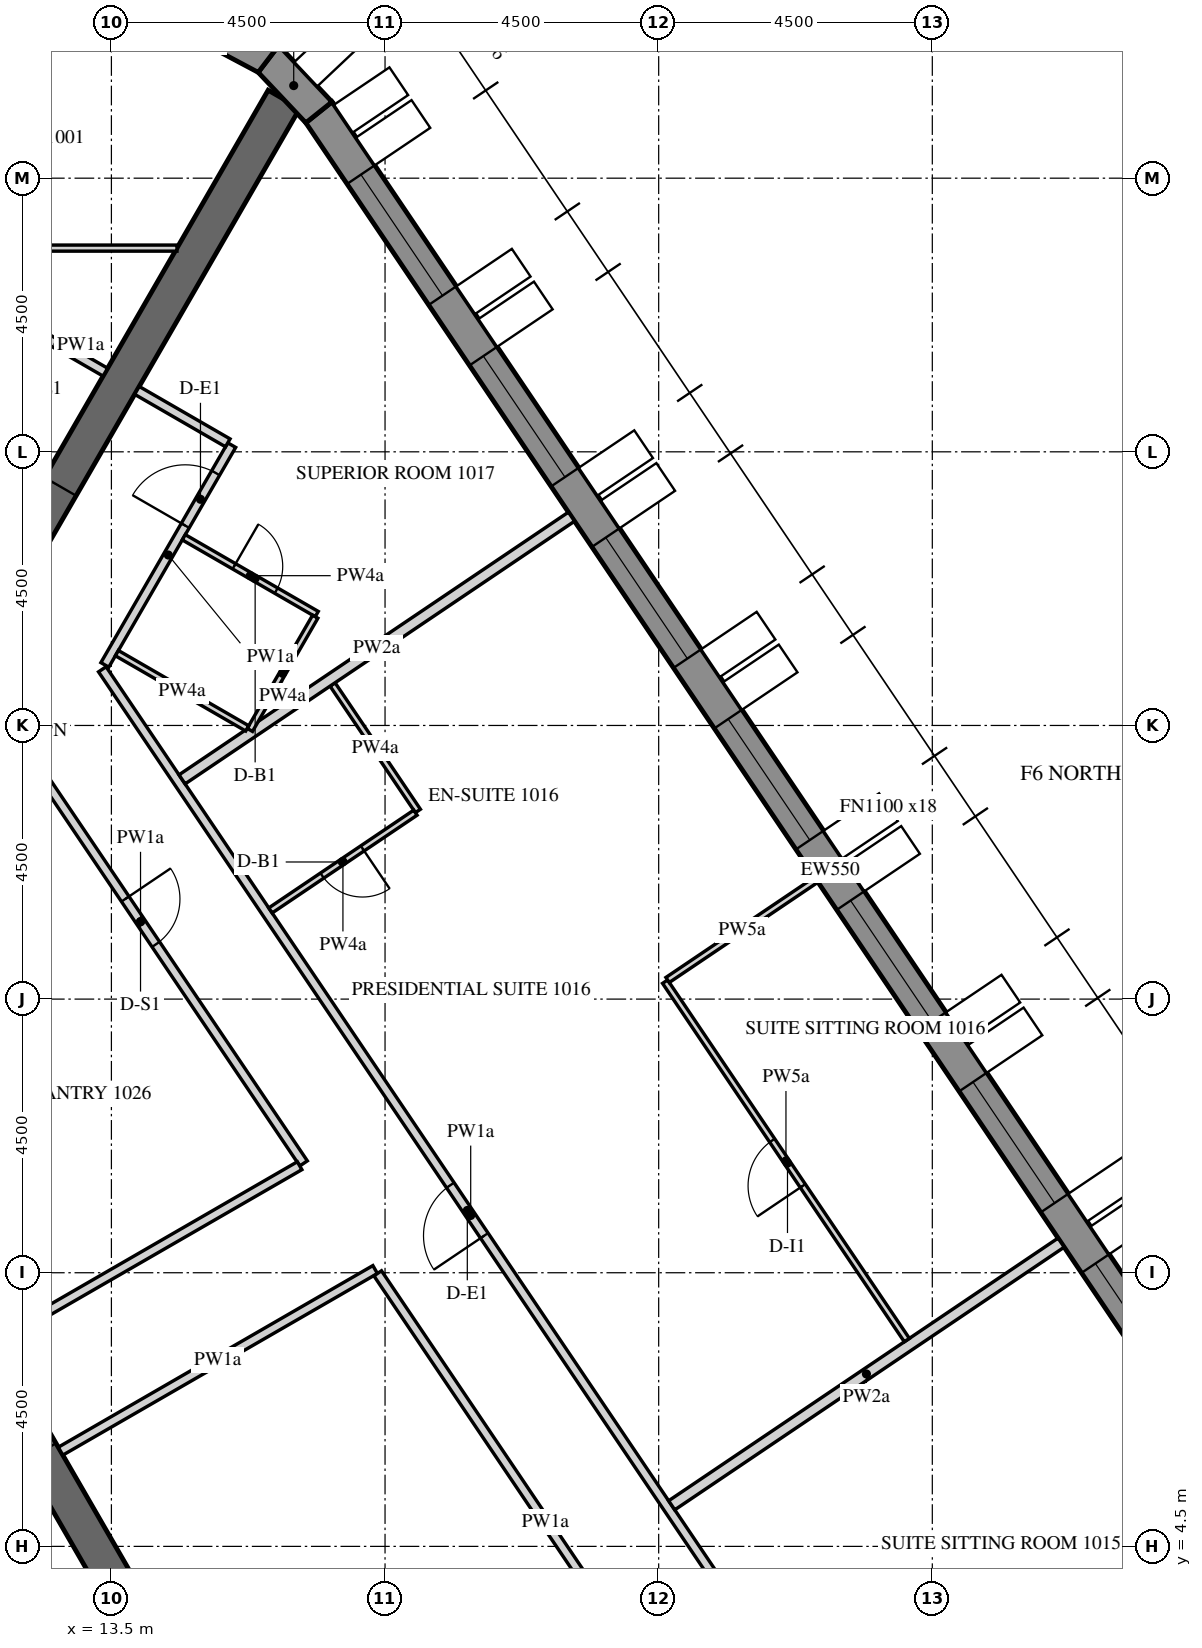
"""IFC4 building model, lengths in metres.
Left out: names, types, materials, properties, quantities, classifications, styles, units other than length and angle.
Written with IfcOpenShell. Run it as: python <this file> out.ifc"""

import sys

from ifc_helpers import new_model, si_unit, direction, frame, frame_2d, origin, place, context, subcontext, project, spatial, polyline, rectangle, outline, extrude, element, fill, save


model = new_model("IFC4")
c1 = context("Model", 3, precision=1e-05, world=origin(), true_north=direction((0.0, 1.0)))
c2 = subcontext(c1, "Body", "Model", "MODEL_VIEW")
j1 = project(units=[si_unit("LENGTHUNIT", "METRE"), si_unit("PLANEANGLEUNIT", "RADIAN")], contexts=[c1])
p1 = place(None, origin())
s1 = spatial("IfcSite", under=j1, at=p1, CompositionType="ELEMENT")
p2 = place(p1, origin())
s2 = spatial("IfcBuilding", under=s1, at=p2, CompositionType="ELEMENT")
p3 = place(p2, frame((0.0, 0.0, 135.0)))
s3 = spatial("IfcBuildingStorey", under=s2, at=p3, CompositionType="ELEMENT", Elevation=135.0)
p4 = place(p3, frame((33.728, 3.153, -0.15), z_axis=(0.0, 0.0, 1.0), x_axis=(-0.559192411416, 0.82903790445, 0.0)))
e1 = element("IfcWall", 1, at=p4, inside=s3, PredefinedType="SOLIDWALL", context=c2, shape_type="SweptSolid", body=[
    extrude(outline(polyline([(-0.026, -0.275), (30.093, -0.275), (30.048, 0.275), (0.026, 0.275), (-0.026, -0.275)])), origin(), (0.0, 0.0, 1.0), 3.9),
])
p5 = place(p4, frame((1.236, 0.0, 1.05)))
e2 = element("IfcOpeningElement", 2, at=p5, cuts=e1, PredefinedType="OPENING", context=c2, shape_type="SweptSolid", body=[
    extrude(rectangle(XDim=2.4, YDim=2.4, at=frame_2d((1.2, 1.2))), frame((0.0, 0.285, 0.0), z_axis=(0.0, -1.0, 0.0), x_axis=(1.0, 0.0, 0.0)), (0.0, 0.0, 1.0), 0.57),
])
p6 = place(p4, frame((4.835, 0.0, 1.05)))
e3 = element("IfcOpeningElement", 3, at=p6, cuts=e1, PredefinedType="OPENING", context=c2, shape_type="SweptSolid", body=[
    extrude(rectangle(XDim=2.4, YDim=2.4, at=frame_2d((1.2, 1.2))), frame((0.0, 0.285, 0.0), z_axis=(0.0, -1.0, 0.0), x_axis=(1.0, 0.0, 0.0)), (0.0, 0.0, 1.0), 0.57),
])
p7 = place(p4, frame((8.436, 0.0, 1.05)))
e4 = element("IfcOpeningElement", 4, at=p7, cuts=e1, PredefinedType="OPENING", context=c2, shape_type="SweptSolid", body=[
    extrude(rectangle(XDim=2.4, YDim=2.4, at=frame_2d((1.2, 1.2))), frame((0.0, 0.285, 0.0), z_axis=(0.0, -1.0, 0.0), x_axis=(1.0, 0.0, 0.0)), (0.0, 0.0, 1.0), 0.57),
])
p8 = place(p4, frame((12.035, 0.0, 1.05)))
e5 = element("IfcOpeningElement", 5, at=p8, cuts=e1, PredefinedType="OPENING", context=c2, shape_type="SweptSolid", body=[
    extrude(rectangle(XDim=2.4, YDim=2.4, at=frame_2d((1.2, 1.2))), frame((0.0, 0.285, 0.0), z_axis=(0.0, -1.0, 0.0), x_axis=(1.0, 0.0, 0.0)), (0.0, 0.0, 1.0), 0.57),
])
p9 = place(p4, frame((15.635, 0.0, 1.05)))
e6 = element("IfcOpeningElement", 6, at=p9, cuts=e1, PredefinedType="OPENING", context=c2, shape_type="SweptSolid", body=[
    extrude(rectangle(XDim=2.4, YDim=2.4, at=frame_2d((1.2, 1.2))), frame((0.0, 0.285, 0.0), z_axis=(0.0, -1.0, 0.0), x_axis=(1.0, 0.0, 0.0)), (0.0, 0.0, 1.0), 0.57),
])
p10 = place(p4, frame((19.236, 0.0, 1.05)))
e7 = element("IfcOpeningElement", 7, at=p10, cuts=e1, PredefinedType="OPENING", context=c2, shape_type="SweptSolid", body=[
    extrude(rectangle(XDim=2.4, YDim=2.4, at=frame_2d((1.2, 1.2))), frame((0.0, 0.285, 0.0), z_axis=(0.0, -1.0, 0.0), x_axis=(1.0, 0.0, 0.0)), (0.0, 0.0, 1.0), 0.57),
])
p11 = place(p4, frame((22.835, 0.0, 1.05)))
e8 = element("IfcOpeningElement", 8, at=p11, cuts=e1, PredefinedType="OPENING", context=c2, shape_type="SweptSolid", body=[
    extrude(rectangle(XDim=2.4, YDim=2.4, at=frame_2d((1.2, 1.2))), frame((0.0, 0.285, 0.0), z_axis=(0.0, -1.0, 0.0), x_axis=(1.0, 0.0, 0.0)), (0.0, 0.0, 1.0), 0.57),
])
p12 = place(p4, frame((26.436, 0.0, 1.05)))
e9 = element("IfcOpeningElement", 9, at=p12, cuts=e1, PredefinedType="OPENING", context=c2, shape_type="SweptSolid", body=[
    extrude(rectangle(XDim=2.4, YDim=2.4, at=frame_2d((1.2, 1.2))), frame((0.0, 0.285, 0.0), z_axis=(0.0, -1.0, 0.0), x_axis=(1.0, 0.0, 0.0)), (0.0, 0.0, 1.0), 0.57),
])
p13 = place(p3, frame((16.913, 28.083, -0.15), z_axis=(0.0, 0.0, 1.0), x_axis=(-0.686196220404, 0.727416488061, 0.0)))
e10 = element("IfcWall", 10, at=p13, inside=s3, PredefinedType="SOLIDWALL", context=c2, shape_type="SweptSolid", body=[
    extrude(outline(polyline([(-0.022, -0.275), (1.253, -0.275), (1.163, 0.275), (0.022, 0.275), (-0.022, -0.275)])), origin(), (0.0, 0.0, 1.0), 3.9),
])
p14 = place(p3, frame((16.083, 28.962, -0.15), z_axis=(0.0, 0.0, 1.0), x_axis=(-0.882995347911, 0.469381737574, 0.0)))
e11 = element("IfcWall", 11, at=p14, inside=s3, PredefinedType="SOLIDWALL", context=c2, shape_type="SweptSolid", body=[
    extrude(outline(polyline([(-0.045, -0.275), (1.253, -0.275), (1.163, 0.275), (0.045, 0.275), (-0.045, -0.275)])), origin(), (0.0, 0.0, 1.0), 3.9),
])
p15 = place(p3, frame((15.819, 0.0, -0.15), z_axis=(0.0, 0.0, 1.0), x_axis=(-0.499999880136, 0.866025472988, 0.0)))
e12 = element("IfcWall", 12, at=p15, inside=s3, PredefinedType="SHEAR", context=c2, shape_type="SweptSolid", body=[
    extrude(outline(polyline([(-0.173, -0.3), (15.993, -0.3), (15.646, 0.3), (0.173, 0.3), (-0.173, -0.3)])), origin(), (0.0, 0.0, 1.0), 3.9),
])
p16 = place(p15, frame((6.981, 0.0, 0.15)))
e13 = element("IfcOpeningElement", 13, at=p16, cuts=e12, PredefinedType="OPENING", context=c2, shape_type="SweptSolid", body=[
    extrude(rectangle(XDim=1.8, YDim=2.4, at=frame_2d((0.9, 1.2))), frame((0.0, 0.31, 0.0), z_axis=(0.0, -1.0, 0.0), x_axis=(1.0, 0.0, 0.0)), (0.0, 0.0, 1.0), 0.62),
])
p17 = place(p3, frame((8.083, 14.0, -0.15), z_axis=(0.0, 0.0, 1.0), x_axis=(0.499997680643, 0.866026742862, 0.0)))
e14 = element("IfcWall", 14, at=p17, inside=s3, PredefinedType="SHEAR", context=c2, shape_type="SweptSolid", body=[
    extrude(rectangle(XDim=16.509, YDim=0.6, at=frame_2d((8.254, 0.0))), origin(), (0.0, 0.0, 1.0), 3.9),
])
p18 = place(p17, frame((7.354, 0.0, 0.15)))
e15 = element("IfcOpeningElement", 15, at=p18, cuts=e14, PredefinedType="OPENING", context=c2, shape_type="SweptSolid", body=[
    extrude(rectangle(XDim=1.8, YDim=2.4, at=frame_2d((0.9, 1.2))), frame((0.0, 0.31, 0.0), z_axis=(0.0, -1.0, 0.0), x_axis=(1.0, 0.0, 0.0)), (0.0, 0.0, 1.0), 0.62),
])
p19 = place(p3, frame((13.4, 23.81, 0.0), z_axis=(0.0, 0.0, 1.0), x_axis=(-0.865989075817, 0.500062916607, 0.0)))
e16 = element("IfcWall", 16, at=p19, inside=s3, PredefinedType="PARTITIONING", context=c2, shape_type="SweptSolid", body=[
    extrude(rectangle(XDim=1.8, YDim=0.15, at=frame_2d((0.9, 0.0))), origin(), (0.0, 0.0, 1.0), 2.838),
])
p20 = place(p3, frame((25.467, 0.96, 0.0), z_axis=(0.0, 0.0, 1.0), x_axis=(-0.559200743185, 0.829032284547, 0.0)))
e17 = element("IfcWall", 17, at=p20, inside=s3, PredefinedType="PARTITIONING", context=c2, shape_type="SweptSolid", body=[
    extrude(rectangle(XDim=21.668, YDim=0.15, at=frame_2d((10.834, 0.0))), origin(), (0.0, 0.0, 1.0), 2.838),
])
p21 = place(p20, frame((10.434, 0.0, 0.0)))
e18 = element("IfcOpeningElement", 18, at=p21, cuts=e17, PredefinedType="OPENING", context=c2, shape_type="SweptSolid", body=[
    extrude(rectangle(XDim=1.0, YDim=2.1, at=frame_2d((0.5, 1.05))), frame((0.0, 0.085, 0.0), z_axis=(0.0, -1.0, 0.0), x_axis=(1.0, 0.0, 0.0)), (0.0, 0.0, 1.0), 0.17),
])
p22 = place(p3, frame((13.392, 18.996, 0.0), z_axis=(0.0, 0.0, 1.0), x_axis=(0.499995902753, 0.866027769318, 0.0)))
e19 = element("IfcWall", 19, at=p22, inside=s3, PredefinedType="PARTITIONING", context=c2, shape_type="SweptSolid", body=[
    extrude(rectangle(XDim=4.173, YDim=0.15, at=frame_2d((2.087, 0.0))), origin(), (0.0, 0.0, 1.0), 2.838),
])
p23 = place(p22, frame((2.645, 0.0, 0.0)))
e20 = element("IfcOpeningElement", 20, at=p23, cuts=e19, PredefinedType="OPENING", context=c2, shape_type="SweptSolid", body=[
    extrude(rectangle(XDim=1.0, YDim=2.1, at=frame_2d((0.5, 1.05))), frame((0.0, 0.085, 0.0), z_axis=(0.0, -1.0, 0.0), x_axis=(1.0, 0.0, 0.0)), (0.0, 0.0, 1.0), 0.17),
])
p24 = place(p3, frame((15.414, 22.648, 0.0), z_axis=(0.0, 0.0, 1.0), x_axis=(-0.866074815912, 0.499914405916, 0.0)))
e21 = element("IfcWall", 21, at=p24, inside=s3, PredefinedType="PARTITIONING", context=c2, shape_type="SweptSolid", body=[
    extrude(rectangle(XDim=1.725, YDim=0.15, at=frame_2d((0.862, 0.0))), origin(), (0.0, 0.0, 1.0), 2.838),
])
p25 = place(p3, frame((12.664, 6.066, 0.0), z_axis=(0.0, 0.0, 1.0), x_axis=(0.866018848283, 0.500011354289, 0.0)))
e22 = element("IfcWall", 22, at=p25, inside=s3, PredefinedType="PARTITIONING", context=c2, shape_type="SweptSolid", body=[
    extrude(rectangle(XDim=5.974, YDim=0.15, at=frame_2d((2.987, 0.0))), origin(), (0.0, 0.0, 1.0), 2.838),
])
p26 = place(p3, frame((17.879, 8.99, 0.0), z_axis=(0.0, 0.0, 1.0), x_axis=(0.559189565351, -0.829039824136, 0.0)))
e23 = element("IfcWall", 23, at=p26, inside=s3, PredefinedType="PARTITIONING", context=c2, shape_type="SweptSolid", body=[
    extrude(rectangle(XDim=9.859, YDim=0.15, at=frame_2d((4.929, 0.0))), origin(), (0.0, 0.0, 1.0), 2.838),
])
p27 = place(p3, frame((11.298, 18.748, 0.0), z_axis=(0.0, 0.0, 1.0), x_axis=(0.559198234291, -0.829033976847, 0.0)))
e24 = element("IfcWall", 24, at=p27, inside=s3, PredefinedType="PARTITIONING", context=c2, shape_type="SweptSolid", body=[
    extrude(rectangle(XDim=9.59, YDim=0.15, at=frame_2d((4.795, 0.0))), origin(), (0.0, 0.0, 1.0), 2.838),
])
p28 = place(p27, frame((4.345, 0.0, 0.0)))
e25 = element("IfcOpeningElement", 25, at=p28, cuts=e24, PredefinedType="OPENING", context=c2, shape_type="SweptSolid", body=[
    extrude(rectangle(XDim=0.9, YDim=2.1, at=frame_2d((0.45, 1.05))), frame((0.0, 0.085, 0.0), z_axis=(0.0, -1.0, 0.0), x_axis=(1.0, 0.0, 0.0)), (0.0, 0.0, 1.0), 0.17),
])
p29 = place(p3, frame((16.595, 10.76, 0.0), z_axis=(0.0, 0.0, 1.0), x_axis=(-0.866019477104, -0.500010265171, 0.0)))
e26 = element("IfcWall", 26, at=p29, inside=s3, PredefinedType="PARTITIONING", context=c2, shape_type="SweptSolid", body=[
    extrude(rectangle(XDim=5.752, YDim=0.15, at=frame_2d((2.876, 0.0))), origin(), (0.0, 0.0, 1.0), 2.838),
])
p30 = place(p3, frame((14.578, 25.85, 0.0), z_axis=(0.0, 0.0, 1.0), x_axis=(-1.0, 0.0, 0.0)))
e27 = element("IfcWall", 27, at=p30, inside=s3, PredefinedType="PARTITIONING", context=c2, shape_type="SweptSolid", body=[
    extrude(rectangle(XDim=8.589, YDim=0.1, at=frame_2d((4.294, 0.0))), origin(), (0.0, 0.0, 1.0), 2.838),
])
p31 = place(p30, frame((4.539, 0.0, 0.0)))
e28 = element("IfcOpeningElement", 28, at=p31, cuts=e27, PredefinedType="OPENING", context=c2, shape_type="SweptSolid", body=[
    extrude(rectangle(XDim=0.9, YDim=2.1, at=frame_2d((0.45, 1.05))), frame((0.0, 0.06, 0.0), z_axis=(0.0, -1.0, 0.0), x_axis=(1.0, 0.0, 0.0)), (0.0, 0.0, 1.0), 0.12),
])
p32 = place(p3, frame((29.119, 9.495, 0.0), z_axis=(0.0, 0.0, 1.0), x_axis=(-0.82903328576, -0.559199258853, 0.0)))
e29 = element("IfcWall", 29, at=p32, inside=s3, PredefinedType="PARTITIONING", context=c2, shape_type="SweptSolid", body=[
    extrude(rectangle(XDim=7.725, YDim=0.18, at=frame_2d((3.863, 0.0))), origin(), (0.0, 0.0, 1.0), 2.838),
])
p33 = place(p3, frame((17.137, 18.675, 0.0), z_axis=(0.0, 0.0, 1.0), x_axis=(0.559203861497, -0.829030181168, 0.0)))
e30 = element("IfcWall", 30, at=p33, inside=s3, PredefinedType="PARTITIONING", context=c2, shape_type="SweptSolid", body=[
    extrude(rectangle(XDim=2.51, YDim=0.1, at=frame_2d((1.255, 0.0))), origin(), (0.0, 0.0, 1.0), 2.838),
])
p34 = place(p3, frame((18.499, 16.566, 0.0), z_axis=(0.0, 0.0, 1.0), x_axis=(-0.82904649496, -0.559179675234, 0.0)))
e31 = element("IfcWall", 31, at=p34, inside=s3, PredefinedType="PARTITIONING", context=c2, shape_type="SweptSolid", body=[
    extrude(rectangle(XDim=2.875, YDim=0.1, at=frame_2d((1.438, 0.0))), origin(), (0.0, 0.0, 1.0), 2.838),
])
p35 = place(p34, frame((1.05, 0.0, 0.0)))
e32 = element("IfcOpeningElement", 32, at=p35, cuts=e31, PredefinedType="OPENING", context=c2, shape_type="SweptSolid", body=[
    extrude(rectangle(XDim=0.8, YDim=2.1, at=frame_2d((0.4, 1.05))), frame((0.0, 0.06, 0.0), z_axis=(0.0, -1.0, 0.0), x_axis=(1.0, 0.0, 0.0)), (0.0, 0.0, 1.0), 0.12),
])
p36 = place(p3, frame((26.581, 7.892, 0.0), z_axis=(0.0, 0.0, 1.0), x_axis=(-0.559185029686, 0.829042883435, 0.0)))
e33 = element("IfcWall", 33, at=p36, inside=s3, PredefinedType="PARTITIONING", context=c2, shape_type="SweptSolid", body=[
    extrude(rectangle(XDim=7.11, YDim=0.1, at=frame_2d((3.555, 0.0))), origin(), (0.0, 0.0, 1.0), 2.838),
])
p37 = place(p36, frame((3.06, 0.0, 0.0)))
e34 = element("IfcOpeningElement", 34, at=p37, cuts=e33, PredefinedType="OPENING", context=c2, shape_type="SweptSolid", body=[
    extrude(rectangle(XDim=0.9, YDim=2.1, at=frame_2d((0.45, 1.05))), frame((0.0, 0.06, 0.0), z_axis=(0.0, -1.0, 0.0), x_axis=(1.0, 0.0, 0.0)), (0.0, 0.0, 1.0), 0.12),
])
p38 = place(p3, frame((22.647, 13.814, 0.0), z_axis=(0.0, 0.0, 1.0), x_axis=(0.829020376361, 0.559218397032, 0.0)))
e35 = element("IfcWall", 35, at=p38, inside=s3, PredefinedType="PARTITIONING", context=c2, shape_type="SweptSolid", body=[
    extrude(rectangle(XDim=2.95, YDim=0.1, at=frame_2d((1.475, 0.0))), origin(), (0.0, 0.0, 1.0), 2.838),
])
p39 = place(p3, frame((21.066, 21.433, 0.0), z_axis=(0.0, 0.0, 1.0), x_axis=(-0.82903328576, -0.559199258853, 0.0)))
e36 = element("IfcWall", 36, at=p39, inside=s3, PredefinedType="PARTITIONING", context=c2, shape_type="SweptSolid", body=[
    extrude(rectangle(XDim=7.725, YDim=0.18, at=frame_2d((3.863, 0.0))), origin(), (0.0, 0.0, 1.0), 2.838),
])
p40 = place(p3, frame((14.69, 21.094, 0.0), z_axis=(0.0, 0.0, 1.0), x_axis=(0.866039067339, -0.499976333282, 0.0)))
e37 = element("IfcWall", 37, at=p40, inside=s3, PredefinedType="PARTITIONING", context=c2, shape_type="SweptSolid", body=[
    extrude(rectangle(XDim=2.525, YDim=0.1, at=frame_2d((1.262, 0.0))), origin(), (0.0, 0.0, 1.0), 2.838),
])
p41 = place(p40, frame((0.955, 0.0, 0.0)))
e38 = element("IfcOpeningElement", 38, at=p41, cuts=e37, PredefinedType="OPENING", context=c2, shape_type="SweptSolid", body=[
    extrude(rectangle(XDim=0.8, YDim=2.1, at=frame_2d((0.4, 1.05))), frame((0.0, 0.06, 0.0), z_axis=(0.0, -1.0, 0.0), x_axis=(1.0, 0.0, 0.0)), (0.0, 0.0, 1.0), 0.12),
])
p42 = place(p3, frame((16.852, 19.789, 0.0), z_axis=(0.0, 0.0, 1.0), x_axis=(-0.499961633463, -0.866047553582, 0.0)))
e39 = element("IfcWall", 39, at=p42, inside=s3, PredefinedType="PARTITIONING", context=c2, shape_type="SweptSolid", body=[
    extrude(rectangle(XDim=2.15, YDim=0.1, at=frame_2d((1.075, 0.0))), origin(), (0.0, 0.0, 1.0), 2.838),
])
p43 = place(p3, frame((15.734, 17.952, 0.0), z_axis=(0.0, 0.0, 1.0), x_axis=(-0.866031185235, 0.4999899861, 0.0)))
e40 = element("IfcWall", 40, at=p43, inside=s3, PredefinedType="PARTITIONING", context=c2, shape_type="SweptSolid", body=[
    extrude(rectangle(XDim=2.475, YDim=0.1, at=frame_2d((1.238, 0.0))), origin(), (0.0, 0.0, 1.0), 2.838),
])
p44 = place(p6, frame((0.0, 0.205, 0.0)))
e41 = element("IfcWindow", 41, at=p44, inside=s3, PartitioningType="DOUBLE_PANEL_VERTICAL", PredefinedType="WINDOW", context=c2, shape_type="SweptSolid", body=[
    extrude(rectangle(XDim=2.4, YDim=2.4, at=frame_2d((1.2, 1.2))), frame((0.0, 0.03, 0.0), z_axis=(0.0, -1.0, 0.0), x_axis=(1.0, 0.0, 0.0)), (0.0, 0.0, 1.0), 0.06),
])
fill(e3, e41)
p45 = place(p7, frame((0.0, 0.205, 0.0)))
e42 = element("IfcWindow", 42, at=p45, inside=s3, PartitioningType="DOUBLE_PANEL_VERTICAL", PredefinedType="WINDOW", context=c2, shape_type="SweptSolid", body=[
    extrude(rectangle(XDim=2.4, YDim=2.4, at=frame_2d((1.2, 1.2))), frame((0.0, 0.03, 0.0), z_axis=(0.0, -1.0, 0.0), x_axis=(1.0, 0.0, 0.0)), (0.0, 0.0, 1.0), 0.06),
])
fill(e4, e42)
p46 = place(p8, frame((0.0, 0.205, 0.0)))
e43 = element("IfcWindow", 43, at=p46, inside=s3, PartitioningType="DOUBLE_PANEL_VERTICAL", PredefinedType="WINDOW", context=c2, shape_type="SweptSolid", body=[
    extrude(rectangle(XDim=2.4, YDim=2.4, at=frame_2d((1.2, 1.2))), frame((0.0, 0.03, 0.0), z_axis=(0.0, -1.0, 0.0), x_axis=(1.0, 0.0, 0.0)), (0.0, 0.0, 1.0), 0.06),
])
fill(e5, e43)
p47 = place(p9, frame((0.0, 0.205, 0.0)))
e44 = element("IfcWindow", 44, at=p47, inside=s3, PartitioningType="DOUBLE_PANEL_VERTICAL", PredefinedType="WINDOW", context=c2, shape_type="SweptSolid", body=[
    extrude(rectangle(XDim=2.4, YDim=2.4, at=frame_2d((1.2, 1.2))), frame((0.0, 0.03, 0.0), z_axis=(0.0, -1.0, 0.0), x_axis=(1.0, 0.0, 0.0)), (0.0, 0.0, 1.0), 0.06),
])
fill(e6, e44)
p48 = place(p10, frame((0.0, 0.205, 0.0)))
e45 = element("IfcWindow", 45, at=p48, inside=s3, PartitioningType="DOUBLE_PANEL_VERTICAL", PredefinedType="WINDOW", context=c2, shape_type="SweptSolid", body=[
    extrude(rectangle(XDim=2.4, YDim=2.4, at=frame_2d((1.2, 1.2))), frame((0.0, 0.03, 0.0), z_axis=(0.0, -1.0, 0.0), x_axis=(1.0, 0.0, 0.0)), (0.0, 0.0, 1.0), 0.06),
])
fill(e7, e45)
p49 = place(p11, frame((0.0, 0.205, 0.0)))
e46 = element("IfcWindow", 46, at=p49, inside=s3, PartitioningType="DOUBLE_PANEL_VERTICAL", PredefinedType="WINDOW", context=c2, shape_type="SweptSolid", body=[
    extrude(rectangle(XDim=2.4, YDim=2.4, at=frame_2d((1.2, 1.2))), frame((0.0, 0.03, 0.0), z_axis=(0.0, -1.0, 0.0), x_axis=(1.0, 0.0, 0.0)), (0.0, 0.0, 1.0), 0.06),
])
fill(e8, e46)
p50 = place(p12, frame((0.0, 0.205, 0.0)))
e47 = element("IfcWindow", 47, at=p50, inside=s3, PartitioningType="DOUBLE_PANEL_VERTICAL", PredefinedType="WINDOW", context=c2, shape_type="SweptSolid", body=[
    extrude(rectangle(XDim=2.4, YDim=2.4, at=frame_2d((1.2, 1.2))), frame((0.0, 0.03, 0.0), z_axis=(0.0, -1.0, 0.0), x_axis=(1.0, 0.0, 0.0)), (0.0, 0.0, 1.0), 0.06),
])
fill(e9, e47)
p51 = place(p18, origin())
e48 = element("IfcDoor", 48, at=p51, inside=s3, OperationType="DOUBLE_DOOR_SINGLE_SWING", PredefinedType="DOOR", context=c2, shape_type="SweptSolid", body=[
    extrude(rectangle(XDim=1.8, YDim=2.4, at=frame_2d((0.9, 1.2))), frame((0.0, 0.025, 0.0), z_axis=(0.0, -1.0, 0.0), x_axis=(1.0, 0.0, 0.0)), (0.0, 0.0, 1.0), 0.05),
])
fill(e15, e48)
p52 = place(p21, origin())
e49 = element("IfcDoor", 49, at=p52, inside=s3, OperationType="SINGLE_SWING_RIGHT", PredefinedType="DOOR", context=c2, shape_type="SweptSolid", body=[
    extrude(rectangle(XDim=1.0, YDim=2.1, at=frame_2d((0.5, 1.05))), frame((0.0, 0.025, 0.0), z_axis=(0.0, -1.0, 0.0), x_axis=(1.0, 0.0, 0.0)), (0.0, 0.0, 1.0), 0.05),
])
fill(e18, e49)
p53 = place(p35, origin())
e50 = element("IfcDoor", 50, at=p53, inside=s3, OperationType="SINGLE_SWING_LEFT", PredefinedType="DOOR", context=c2, shape_type="SweptSolid", body=[
    extrude(rectangle(XDim=0.8, YDim=2.1, at=frame_2d((0.4, 1.05))), frame((0.0, 0.025, 0.0), z_axis=(0.0, -1.0, 0.0), x_axis=(1.0, 0.0, 0.0)), (0.0, 0.0, 1.0), 0.05),
])
fill(e32, e50)
p54 = place(p37, origin())
e51 = element("IfcDoor", 51, at=p54, inside=s3, OperationType="SINGLE_SWING_RIGHT", PredefinedType="DOOR", context=c2, shape_type="SweptSolid", body=[
    extrude(rectangle(XDim=0.9, YDim=2.1, at=frame_2d((0.45, 1.05))), frame((0.0, 0.025, 0.0), z_axis=(0.0, -1.0, 0.0), x_axis=(1.0, 0.0, 0.0)), (0.0, 0.0, 1.0), 0.05),
])
fill(e34, e51)
p55 = place(p23, origin())
e52 = element("IfcDoor", 52, at=p55, inside=s3, OperationType="SINGLE_SWING_LEFT", PredefinedType="DOOR", context=c2, shape_type="SweptSolid", body=[
    extrude(rectangle(XDim=1.0, YDim=2.1, at=frame_2d((0.5, 1.05))), frame((0.0, 0.025, 0.0), z_axis=(0.0, -1.0, 0.0), x_axis=(1.0, 0.0, 0.0)), (0.0, 0.0, 1.0), 0.05),
])
fill(e20, e52)
p56 = place(p41, origin())
e53 = element("IfcDoor", 53, at=p56, inside=s3, OperationType="SINGLE_SWING_LEFT", PredefinedType="DOOR", context=c2, shape_type="SweptSolid", body=[
    extrude(rectangle(XDim=0.8, YDim=2.1, at=frame_2d((0.4, 1.05))), frame((0.0, 0.025, 0.0), z_axis=(0.0, -1.0, 0.0), x_axis=(1.0, 0.0, 0.0)), (0.0, 0.0, 1.0), 0.05),
])
fill(e38, e53)
p57 = place(p28, origin())
e54 = element("IfcDoor", 54, at=p57, inside=s3, OperationType="SINGLE_SWING_RIGHT", PredefinedType="DOOR", context=c2, shape_type="SweptSolid", body=[
    extrude(rectangle(XDim=0.9, YDim=2.1, at=frame_2d((0.45, 1.05))), frame((0.0, 0.025, 0.0), z_axis=(0.0, -1.0, 0.0), x_axis=(1.0, 0.0, 0.0)), (0.0, 0.0, 1.0), 0.05),
])
fill(e25, e54)
save(model, sys.argv[1])
